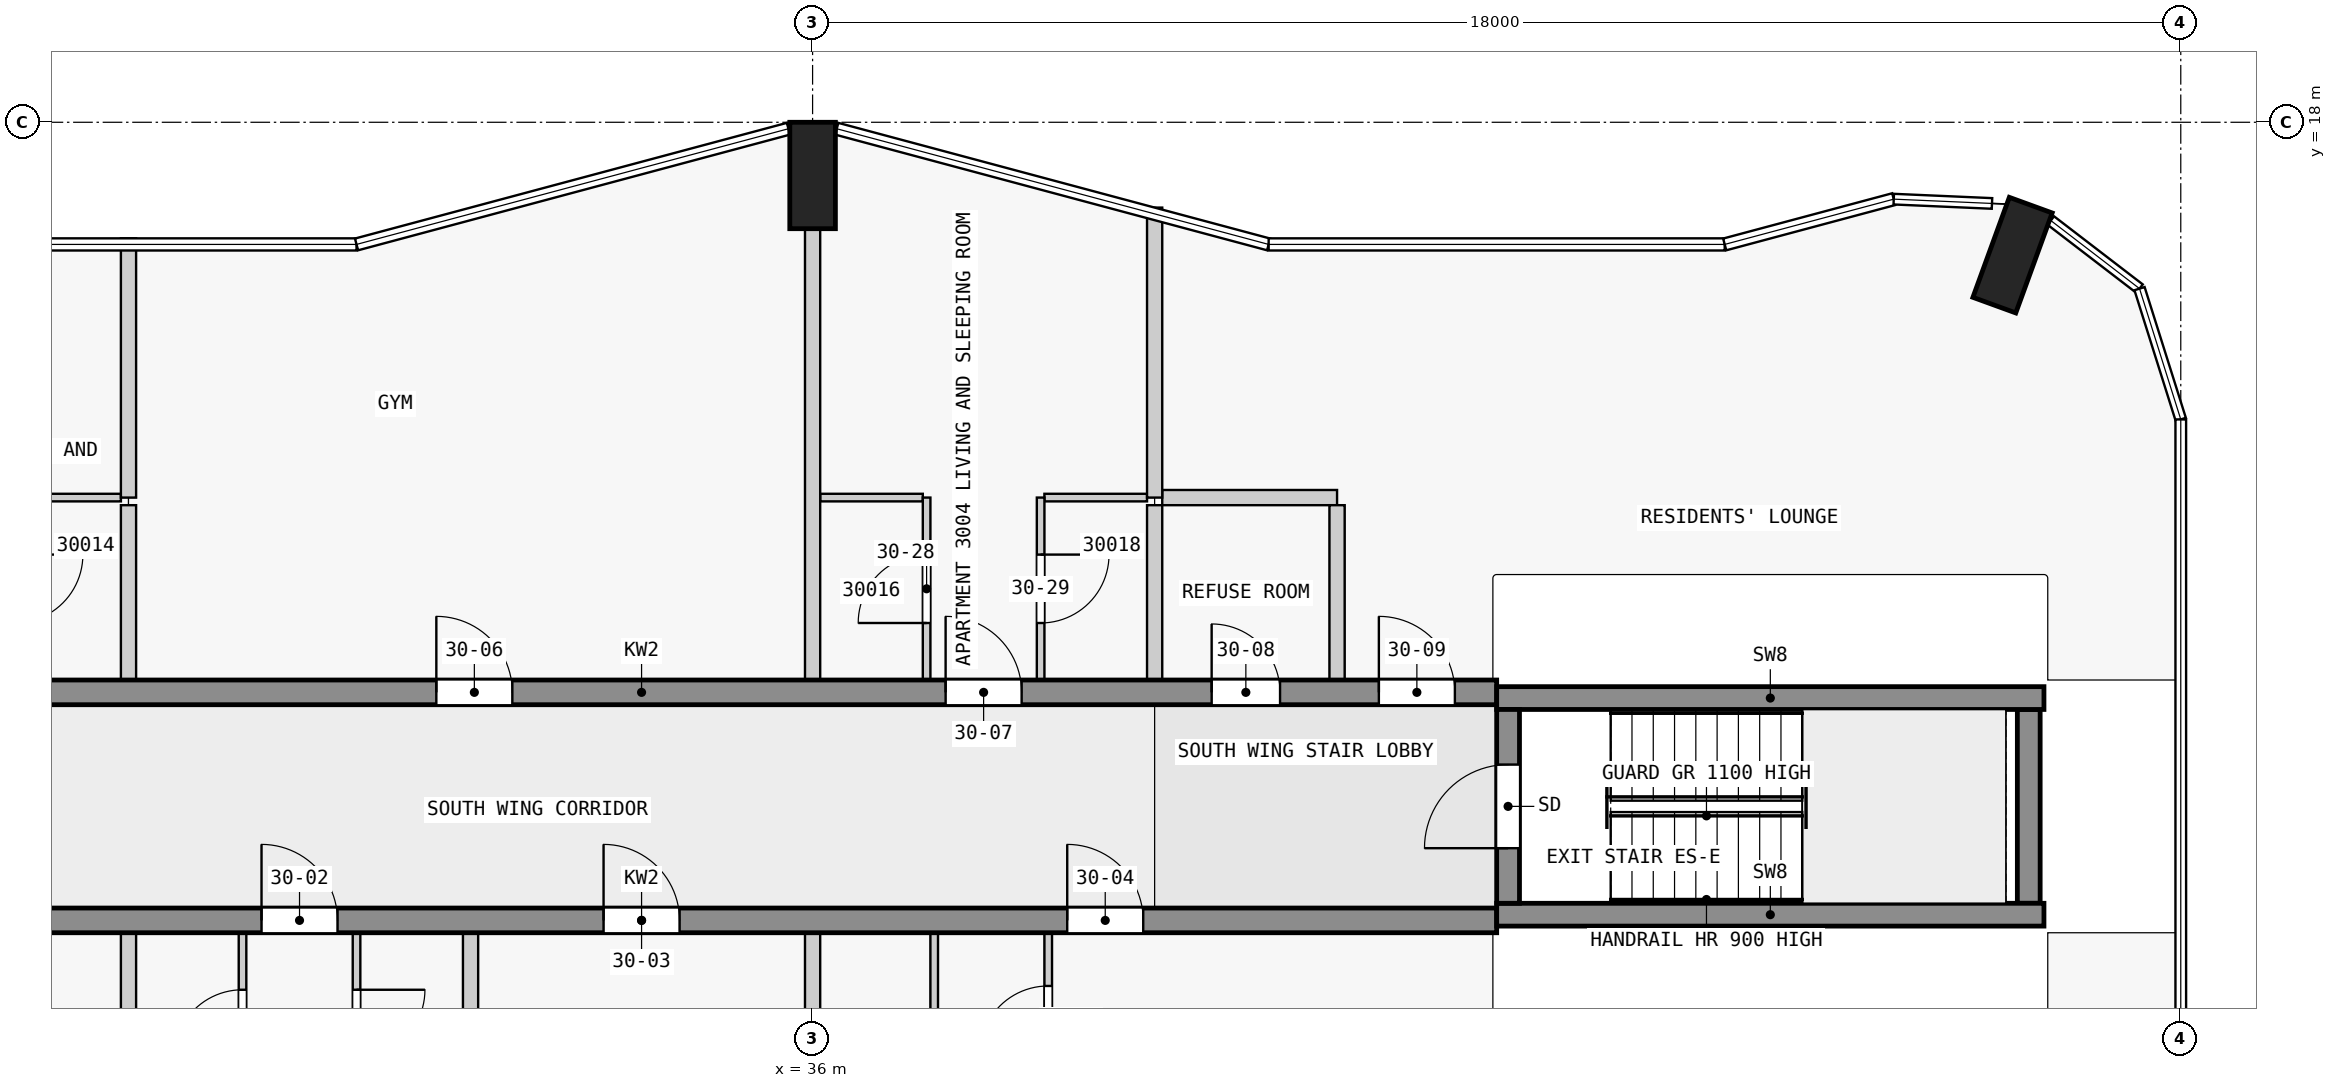
"""IFC4 building model, lengths in metres.
Left out: names, types, materials, properties, quantities, classifications, styles, units other than length and angle.
Written with IfcOpenShell. Run it as: python <this file> out.ifc"""

import sys

from ifc_helpers import new_model, si_unit, direction, frame, frame_2d, origin, origin_2d, place, context, subcontext, project, spatial, rectangle, extrude, element, fill, save


model = new_model("IFC4")
c1 = context("Model", 3, precision=1e-05, world=origin(), true_north=direction((0.0, 1.0)))
c2 = subcontext(c1, "Body", "Model", "MODEL_VIEW")
j1 = project(units=[si_unit("LENGTHUNIT", "METRE"), si_unit("PLANEANGLEUNIT", "RADIAN")], contexts=[c1])
p1 = place(None, origin())
s1 = spatial("IfcSite", under=j1, at=p1, CompositionType="ELEMENT")
p2 = place(p1, origin())
s2 = spatial("IfcBuilding", under=s1, at=p2, CompositionType="ELEMENT")
p3 = place(p2, frame((0.0, 0.0, 116.8)))
s3 = spatial("IfcBuildingStorey", under=s2, at=p3, CompositionType="ELEMENT", Elevation=116.8)
for number, where, z_axis, x_axis in (
    (1, (51.787, 16.252, 0.0), (0.0, 0.0, 1.0), (-0.94, 0.342, 0.0)),
    (2, (36.0, 17.3, 0.0), (0.0, 0.0, 1.0), (1.0, 0.0, 0.0)),
):
    element("IfcColumn", number, at=place(p3, frame(where, z_axis=z_axis, x_axis=x_axis)), inside=s3, PredefinedType="COLUMN", context=c2, shape_type="SweptSolid", body=[
        extrude(rectangle(XDim=0.6, YDim=1.4, at=origin_2d()), origin(), (0.0, 0.0, 1.0), 3.5),
    ])
p4 = place(p3, frame((45.15, 7.725, 0.0), z_axis=(0.0, 0.0, 1.0), x_axis=(0.0, 1.0, 0.0)))
e3 = element("IfcWall", 3, at=p4, inside=s3, PredefinedType="SHEAR", context=c2, shape_type="SweptSolid", body=[
    extrude(rectangle(XDim=2.55, YDim=0.3, at=frame_2d((1.275, 0.0))), origin(), (0.0, 0.0, 1.0), 3.5),
])
p5 = place(p4, frame((0.725, 0.0, 0.0)))
e4 = element("IfcOpeningElement", 4, at=p5, cuts=e3, PredefinedType="OPENING", context=c2, shape_type="SweptSolid", body=[
    extrude(rectangle(XDim=1.1, YDim=2.1, at=frame_2d((0.55, 1.05))), frame((0.0, 0.16, 0.0), z_axis=(0.0, -1.0, 0.0), x_axis=(1.0, 0.0, 0.0)), (0.0, 0.0, 1.0), 0.32),
])
p6 = place(p3, frame((52.0, 7.725, 0.0), z_axis=(0.0, 0.0, 1.0), x_axis=(0.0, 1.0, 0.0)))
e5 = element("IfcWall", 5, at=p6, inside=s3, PredefinedType="SHEAR", context=c2, shape_type="SweptSolid", body=[
    extrude(rectangle(XDim=2.55, YDim=0.3, at=frame_2d((1.275, 0.0))), origin(), (0.0, 0.0, 1.0), 3.5),
])
for number, where, z_axis, x_axis in (
    (6, (45.0, 7.575, 0.0), (0.0, 0.0, 1.0), (1.0, 0.0, 0.0)),
    (7, (45.0, 10.425, 0.0), (0.0, 0.0, 1.0), (1.0, 0.0, 0.0)),
):
    element("IfcWall", number, at=place(p3, frame(where, z_axis=z_axis, x_axis=x_axis)), inside=s3, PredefinedType="SHEAR", context=c2, shape_type="SweptSolid", body=[
        extrude(rectangle(XDim=7.2, YDim=0.3, at=frame_2d((3.6, 0.0))), origin(), (0.0, 0.0, 1.0), 3.5),
    ])
p7 = place(p3, frame((22.5, 7.5, 0.0), z_axis=(0.0, 0.0, 1.0), x_axis=(1.0, 0.0, 0.0)))
e8 = element("IfcWall", 8, at=p7, inside=s3, PredefinedType="SHEAR", context=c2, shape_type="SweptSolid", body=[
    extrude(rectangle(XDim=22.5, YDim=0.325, at=frame_2d((11.25, 0.0))), origin(), (0.0, 0.0, 1.0), 3.25),
])
p8 = place(p7, frame((1.75, 0.0, 0.0)))
e9 = element("IfcOpeningElement", 9, at=p8, cuts=e8, PredefinedType="OPENING", context=c2, shape_type="SweptSolid", body=[
    extrude(rectangle(XDim=1.0, YDim=2.1, at=frame_2d((0.5, 1.05))), frame((0.0, 0.172, 0.0), z_axis=(0.0, -1.0, 0.0), x_axis=(1.0, 0.0, 0.0)), (0.0, 0.0, 1.0), 0.345),
])
p9 = place(p7, frame((6.25, 0.0, 0.0)))
e10 = element("IfcOpeningElement", 10, at=p9, cuts=e8, PredefinedType="OPENING", context=c2, shape_type="SweptSolid", body=[
    extrude(rectangle(XDim=1.0, YDim=2.1, at=frame_2d((0.5, 1.05))), frame((0.0, 0.172, 0.0), z_axis=(0.0, -1.0, 0.0), x_axis=(1.0, 0.0, 0.0)), (0.0, 0.0, 1.0), 0.345),
])
p10 = place(p7, frame((10.75, 0.0, 0.0)))
e11 = element("IfcOpeningElement", 11, at=p10, cuts=e8, PredefinedType="OPENING", context=c2, shape_type="SweptSolid", body=[
    extrude(rectangle(XDim=1.0, YDim=2.1, at=frame_2d((0.5, 1.05))), frame((0.0, 0.172, 0.0), z_axis=(0.0, -1.0, 0.0), x_axis=(1.0, 0.0, 0.0)), (0.0, 0.0, 1.0), 0.345),
])
p11 = place(p7, frame((16.85, 0.0, 0.0)))
e12 = element("IfcOpeningElement", 12, at=p11, cuts=e8, PredefinedType="OPENING", context=c2, shape_type="SweptSolid", body=[
    extrude(rectangle(XDim=1.0, YDim=2.1, at=frame_2d((0.5, 1.05))), frame((0.0, 0.172, 0.0), z_axis=(0.0, -1.0, 0.0), x_axis=(1.0, 0.0, 0.0)), (0.0, 0.0, 1.0), 0.345),
])
p12 = place(p3, frame((22.5, 10.5, 0.0), z_axis=(0.0, 0.0, 1.0), x_axis=(1.0, 0.0, 0.0)))
e13 = element("IfcWall", 13, at=p12, inside=s3, PredefinedType="SHEAR", context=c2, shape_type="SweptSolid", body=[
    extrude(rectangle(XDim=22.5, YDim=0.325, at=frame_2d((11.25, 0.0))), origin(), (0.0, 0.0, 1.0), 3.25),
])
p13 = place(p12, frame((1.75, 0.0, 0.0)))
e14 = element("IfcOpeningElement", 14, at=p13, cuts=e13, PredefinedType="OPENING", context=c2, shape_type="SweptSolid", body=[
    extrude(rectangle(XDim=1.0, YDim=2.1, at=frame_2d((0.5, 1.05))), frame((0.0, 0.172, 0.0), z_axis=(0.0, -1.0, 0.0), x_axis=(1.0, 0.0, 0.0)), (0.0, 0.0, 1.0), 0.345),
])
p14 = place(p12, frame((8.55, 0.0, 0.0)))
e15 = element("IfcOpeningElement", 15, at=p14, cuts=e13, PredefinedType="OPENING", context=c2, shape_type="SweptSolid", body=[
    extrude(rectangle(XDim=1.0, YDim=2.1, at=frame_2d((0.5, 1.05))), frame((0.0, 0.172, 0.0), z_axis=(0.0, -1.0, 0.0), x_axis=(1.0, 0.0, 0.0)), (0.0, 0.0, 1.0), 0.345),
])
p15 = place(p12, frame((15.25, 0.0, 0.0)))
e16 = element("IfcOpeningElement", 16, at=p15, cuts=e13, PredefinedType="OPENING", context=c2, shape_type="SweptSolid", body=[
    extrude(rectangle(XDim=1.0, YDim=2.1, at=frame_2d((0.5, 1.05))), frame((0.0, 0.172, 0.0), z_axis=(0.0, -1.0, 0.0), x_axis=(1.0, 0.0, 0.0)), (0.0, 0.0, 1.0), 0.345),
])
p16 = place(p12, frame((18.75, 0.0, 0.0)))
e17 = element("IfcOpeningElement", 17, at=p16, cuts=e13, PredefinedType="OPENING", context=c2, shape_type="SweptSolid", body=[
    extrude(rectangle(XDim=0.9, YDim=2.1, at=frame_2d((0.45, 1.05))), frame((0.0, 0.172, 0.0), z_axis=(0.0, -1.0, 0.0), x_axis=(1.0, 0.0, 0.0)), (0.0, 0.0, 1.0), 0.345),
])
p17 = place(p12, frame((20.95, 0.0, 0.0)))
e18 = element("IfcOpeningElement", 18, at=p17, cuts=e13, PredefinedType="OPENING", context=c2, shape_type="SweptSolid", body=[
    extrude(rectangle(XDim=1.0, YDim=2.1, at=frame_2d((0.5, 1.05))), frame((0.0, 0.172, 0.0), z_axis=(0.0, -1.0, 0.0), x_axis=(1.0, 0.0, 0.0)), (0.0, 0.0, 1.0), 0.345),
])
for number, where, z_axis, x_axis in (
    (19, (26.9, 13.062, 0.0), (0.0, 0.0, 1.0), (-1.0, 0.0, 0.0)),
    (20, (37.45, 13.062, 0.0), (0.0, 0.0, 1.0), (-1.0, 0.0, 0.0)),
    (21, (40.4, 13.062, 0.0), (0.0, 0.0, 1.0), (-1.0, 0.0, 0.0)),
):
    element("IfcWall", number, at=place(p3, frame(where, z_axis=z_axis, x_axis=x_axis)), inside=s3, PredefinedType="PARTITIONING", context=c2, shape_type="SweptSolid", body=[
        extrude(rectangle(XDim=1.35, YDim=0.1, at=frame_2d((0.675, 0.0))), origin(), (0.0, 0.0, 1.0), 3.25),
    ])
p18 = place(p3, frame((42.9, 13.062, 0.0), z_axis=(0.0, 0.0, 1.0), x_axis=(-1.0, 0.0, 0.0)))
e22 = element("IfcWall", 22, at=p18, inside=s3, PredefinedType="PARTITIONING", context=c2, shape_type="SweptSolid", body=[
    extrude(rectangle(XDim=2.3, YDim=0.2, at=frame_2d((1.15, 0.0))), origin(), (0.0, 0.0, 1.0), 3.25),
])
p19 = place(p3, frame((27.0, 16.473, 0.0), z_axis=(0.0, 0.0, 1.0), x_axis=(0.0, -1.0, 0.0)))
e23 = element("IfcWall", 23, at=p19, inside=s3, PredefinedType="PARTITIONING", context=c2, shape_type="SweptSolid", body=[
    extrude(rectangle(XDim=3.411, YDim=0.2, at=frame_2d((1.705, 0.0))), origin(), (0.0, 0.0, 1.0), 3.25),
])
p20 = place(p3, frame((27.0, 1.527, 0.0), z_axis=(0.0, 0.0, 1.0), x_axis=(0.0, 1.0, 0.0)))
e24 = element("IfcWall", 24, at=p20, inside=s3, PredefinedType="PARTITIONING", context=c2, shape_type="SweptSolid", body=[
    extrude(rectangle(XDim=5.811, YDim=0.2, at=frame_2d((2.905, 0.0))), origin(), (0.0, 0.0, 1.0), 3.25),
])
p21 = place(p3, frame((27.0, 10.663, 0.0), z_axis=(0.0, 0.0, 1.0), x_axis=(0.0, 1.0, 0.0)))
e25 = element("IfcWall", 25, at=p21, inside=s3, PredefinedType="PARTITIONING", context=c2, shape_type="SweptSolid", body=[
    extrude(rectangle(XDim=2.3, YDim=0.2, at=frame_2d((1.15, 0.0))), origin(), (0.0, 0.0, 1.0), 3.25),
])
p22 = place(p3, frame((28.5, 4.938, 0.0), z_axis=(0.0, 0.0, 1.0), x_axis=(0.0, 1.0, 0.0)))
e26 = element("IfcWall", 26, at=p22, inside=s3, PredefinedType="PARTITIONING", context=c2, shape_type="SweptSolid", body=[
    extrude(rectangle(XDim=2.4, YDim=0.1, at=frame_2d((1.2, 0.0))), origin(), (0.0, 0.0, 1.0), 3.25),
])
p23 = place(p22, frame((0.75, 0.0, 0.0)))
e27 = element("IfcOpeningElement", 27, at=p23, cuts=e26, PredefinedType="OPENING", context=c2, shape_type="SweptSolid", body=[
    extrude(rectangle(XDim=0.9, YDim=2.1, at=frame_2d((0.45, 1.05))), frame((0.0, 0.06, 0.0), z_axis=(0.0, -1.0, 0.0), x_axis=(1.0, 0.0, 0.0)), (0.0, 0.0, 1.0), 0.12),
])
p24 = place(p3, frame((30.0, 7.337, 0.0), z_axis=(0.0, 0.0, 1.0), x_axis=(0.0, -1.0, 0.0)))
e28 = element("IfcWall", 28, at=p24, inside=s3, PredefinedType="PARTITIONING", context=c2, shape_type="SweptSolid", body=[
    extrude(rectangle(XDim=2.4, YDim=0.1, at=frame_2d((1.2, 0.0))), origin(), (0.0, 0.0, 1.0), 3.25),
])
p25 = place(p24, frame((0.75, 0.0, 0.0)))
e29 = element("IfcOpeningElement", 29, at=p25, cuts=e28, PredefinedType="OPENING", context=c2, shape_type="SweptSolid", body=[
    extrude(rectangle(XDim=0.9, YDim=2.1, at=frame_2d((0.45, 1.05))), frame((0.0, 0.06, 0.0), z_axis=(0.0, -1.0, 0.0), x_axis=(1.0, 0.0, 0.0)), (0.0, 0.0, 1.0), 0.12),
])
p26 = place(p3, frame((31.5, 5.038, 0.0), z_axis=(0.0, 0.0, 1.0), x_axis=(0.0, 1.0, 0.0)))
e30 = element("IfcWall", 30, at=p26, inside=s3, PredefinedType="PARTITIONING", context=c2, shape_type="SweptSolid", body=[
    extrude(rectangle(XDim=2.3, YDim=0.2, at=frame_2d((1.15, 0.0))), origin(), (0.0, 0.0, 1.0), 3.25),
])
for number, where, z_axis, x_axis in (
    (31, (36.0, 1.4, 0.0), (0.0, 0.0, 1.0), (0.0, 1.0, 0.0)),
    (32, (36.0, 10.663, 0.0), (0.0, 0.0, 1.0), (0.0, 1.0, 0.0)),
):
    element("IfcWall", number, at=place(p3, frame(where, z_axis=z_axis, x_axis=x_axis)), inside=s3, PredefinedType="PARTITIONING", context=c2, shape_type="SweptSolid", body=[
        extrude(rectangle(XDim=5.938, YDim=0.2, at=frame_2d((2.969, 0.0))), origin(), (0.0, 0.0, 1.0), 3.25),
    ])
p27 = place(p3, frame((37.5, 10.663, 0.0), z_axis=(0.0, 0.0, 1.0), x_axis=(0.0, 1.0, 0.0)))
e33 = element("IfcWall", 33, at=p27, inside=s3, PredefinedType="PARTITIONING", context=c2, shape_type="SweptSolid", body=[
    extrude(rectangle(XDim=2.4, YDim=0.1, at=frame_2d((1.2, 0.0))), origin(), (0.0, 0.0, 1.0), 3.25),
])
p28 = place(p27, frame((0.75, 0.0, 0.0)))
e34 = element("IfcOpeningElement", 34, at=p28, cuts=e33, PredefinedType="OPENING", context=c2, shape_type="SweptSolid", body=[
    extrude(rectangle(XDim=0.9, YDim=2.1, at=frame_2d((0.45, 1.05))), frame((0.0, 0.06, 0.0), z_axis=(0.0, -1.0, 0.0), x_axis=(1.0, 0.0, 0.0)), (0.0, 0.0, 1.0), 0.12),
])
p29 = place(p3, frame((37.6, 4.988, 0.0), z_axis=(0.0, 0.0, 1.0), x_axis=(0.0, 1.0, 0.0)))
e35 = element("IfcWall", 35, at=p29, inside=s3, PredefinedType="PARTITIONING", context=c2, shape_type="SweptSolid", body=[
    extrude(rectangle(XDim=2.35, YDim=0.1, at=frame_2d((1.175, 0.0))), origin(), (0.0, 0.0, 1.0), 3.25),
])
p30 = place(p3, frame((39.0, 13.062, 0.0), z_axis=(0.0, 0.0, 1.0), x_axis=(0.0, -1.0, 0.0)))
e36 = element("IfcWall", 36, at=p30, inside=s3, PredefinedType="PARTITIONING", context=c2, shape_type="SweptSolid", body=[
    extrude(rectangle(XDim=2.4, YDim=0.1, at=frame_2d((1.2, 0.0))), origin(), (0.0, 0.0, 1.0), 3.25),
])
p31 = place(p30, frame((0.75, 0.0, 0.0)))
e37 = element("IfcOpeningElement", 37, at=p31, cuts=e36, PredefinedType="OPENING", context=c2, shape_type="SweptSolid", body=[
    extrude(rectangle(XDim=0.9, YDim=2.1, at=frame_2d((0.45, 1.05))), frame((0.0, 0.06, 0.0), z_axis=(0.0, -1.0, 0.0), x_axis=(1.0, 0.0, 0.0)), (0.0, 0.0, 1.0), 0.12),
])
p32 = place(p3, frame((39.1, 4.988, 0.0), z_axis=(0.0, 0.0, 1.0), x_axis=(0.0, 1.0, 0.0)))
e38 = element("IfcWall", 38, at=p32, inside=s3, PredefinedType="PARTITIONING", context=c2, shape_type="SweptSolid", body=[
    extrude(rectangle(XDim=2.35, YDim=0.1, at=frame_2d((1.175, 0.0))), origin(), (0.0, 0.0, 1.0), 3.25),
])
p33 = place(p32, frame((0.75, 0.0, 0.0)))
e39 = element("IfcOpeningElement", 39, at=p33, cuts=e38, PredefinedType="OPENING", context=c2, shape_type="SweptSolid", body=[
    extrude(rectangle(XDim=0.9, YDim=2.1, at=frame_2d((0.45, 1.05))), frame((0.0, 0.06, 0.0), z_axis=(0.0, -1.0, 0.0), x_axis=(1.0, 0.0, 0.0)), (0.0, 0.0, 1.0), 0.12),
])
p34 = place(p3, frame((40.5, 16.878, 0.0), z_axis=(0.0, 0.0, 1.0), x_axis=(0.0, -1.0, 0.0)))
e40 = element("IfcWall", 40, at=p34, inside=s3, PredefinedType="PARTITIONING", context=c2, shape_type="SweptSolid", body=[
    extrude(rectangle(XDim=3.815, YDim=0.2, at=frame_2d((1.908, 0.0))), origin(), (0.0, 0.0, 1.0), 3.25),
])
for number, where, z_axis, x_axis in (
    (41, (40.5, 10.663, 0.0), (0.0, 0.0, 1.0), (0.0, 1.0, 0.0)),
    (42, (42.9, 10.663, 0.0), (0.0, 0.0, 1.0), (0.0, 1.0, 0.0)),
):
    element("IfcWall", number, at=place(p3, frame(where, z_axis=z_axis, x_axis=x_axis)), inside=s3, PredefinedType="PARTITIONING", context=c2, shape_type="SweptSolid", body=[
        extrude(rectangle(XDim=2.3, YDim=0.2, at=frame_2d((1.15, 0.0))), origin(), (0.0, 0.0, 1.0), 3.25),
    ])
p35 = place(p5, origin())
e43 = element("IfcDoor", 43, at=p35, inside=s3, OperationType="SINGLE_SWING_LEFT", PredefinedType="DOOR", context=c2, shape_type="SweptSolid", body=[
    extrude(rectangle(XDim=1.1, YDim=2.1, at=frame_2d((0.55, 1.05))), frame((0.0, 0.025, 0.0), z_axis=(0.0, -1.0, 0.0), x_axis=(1.0, 0.0, 0.0)), (0.0, 0.0, 1.0), 0.05),
])
fill(e4, e43)
p36 = place(p9, origin())
e44 = element("IfcDoor", 44, at=p36, inside=s3, OperationType="SINGLE_SWING_LEFT", PredefinedType="DOOR", context=c2, shape_type="SweptSolid", body=[
    extrude(rectangle(XDim=1.0, YDim=2.1, at=frame_2d((0.5, 1.05))), frame((0.0, 0.025, 0.0), z_axis=(0.0, -1.0, 0.0), x_axis=(1.0, 0.0, 0.0)), (0.0, 0.0, 1.0), 0.05),
])
fill(e10, e44)
p37 = place(p10, origin())
e45 = element("IfcDoor", 45, at=p37, inside=s3, OperationType="SINGLE_SWING_LEFT", PredefinedType="DOOR", context=c2, shape_type="SweptSolid", body=[
    extrude(rectangle(XDim=1.0, YDim=2.1, at=frame_2d((0.5, 1.05))), frame((0.0, 0.025, 0.0), z_axis=(0.0, -1.0, 0.0), x_axis=(1.0, 0.0, 0.0)), (0.0, 0.0, 1.0), 0.05),
])
fill(e11, e45)
p38 = place(p11, origin())
e46 = element("IfcDoor", 46, at=p38, inside=s3, OperationType="SINGLE_SWING_RIGHT", PredefinedType="DOOR", context=c2, shape_type="SweptSolid", body=[
    extrude(rectangle(XDim=1.0, YDim=2.1, at=frame_2d((0.5, 1.05))), frame((0.0, 0.025, 0.0), z_axis=(0.0, -1.0, 0.0), x_axis=(1.0, 0.0, 0.0)), (0.0, 0.0, 1.0), 0.05),
])
fill(e12, e46)
p39 = place(p14, origin())
e47 = element("IfcDoor", 47, at=p39, inside=s3, OperationType="SINGLE_SWING_LEFT", PredefinedType="DOOR", context=c2, shape_type="SweptSolid", body=[
    extrude(rectangle(XDim=1.0, YDim=2.1, at=frame_2d((0.5, 1.05))), frame((0.0, 0.025, 0.0), z_axis=(0.0, -1.0, 0.0), x_axis=(1.0, 0.0, 0.0)), (0.0, 0.0, 1.0), 0.05),
])
fill(e15, e47)
p40 = place(p15, origin())
e48 = element("IfcDoor", 48, at=p40, inside=s3, OperationType="SINGLE_SWING_RIGHT", PredefinedType="DOOR", context=c2, shape_type="SweptSolid", body=[
    extrude(rectangle(XDim=1.0, YDim=2.1, at=frame_2d((0.5, 1.05))), frame((0.0, 0.025, 0.0), z_axis=(0.0, -1.0, 0.0), x_axis=(1.0, 0.0, 0.0)), (0.0, 0.0, 1.0), 0.05),
])
fill(e16, e48)
p41 = place(p16, origin())
e49 = element("IfcDoor", 49, at=p41, inside=s3, OperationType="SINGLE_SWING_RIGHT", PredefinedType="DOOR", context=c2, shape_type="SweptSolid", body=[
    extrude(rectangle(XDim=0.9, YDim=2.1, at=frame_2d((0.45, 1.05))), frame((0.0, 0.025, 0.0), z_axis=(0.0, -1.0, 0.0), x_axis=(1.0, 0.0, 0.0)), (0.0, 0.0, 1.0), 0.05),
])
fill(e17, e49)
p42 = place(p17, origin())
e50 = element("IfcDoor", 50, at=p42, inside=s3, OperationType="SINGLE_SWING_RIGHT", PredefinedType="DOOR", context=c2, shape_type="SweptSolid", body=[
    extrude(rectangle(XDim=1.0, YDim=2.1, at=frame_2d((0.5, 1.05))), frame((0.0, 0.025, 0.0), z_axis=(0.0, -1.0, 0.0), x_axis=(1.0, 0.0, 0.0)), (0.0, 0.0, 1.0), 0.05),
])
fill(e18, e50)
p43 = place(p23, origin())
e51 = element("IfcDoor", 51, at=p43, inside=s3, OperationType="SINGLE_SWING_LEFT", PredefinedType="DOOR", context=c2, shape_type="SweptSolid", body=[
    extrude(rectangle(XDim=0.9, YDim=2.1, at=frame_2d((0.45, 1.05))), frame((0.0, 0.025, 0.0), z_axis=(0.0, -1.0, 0.0), x_axis=(1.0, 0.0, 0.0)), (0.0, 0.0, 1.0), 0.05),
])
fill(e27, e51)
p44 = place(p25, origin())
e52 = element("IfcDoor", 52, at=p44, inside=s3, OperationType="SINGLE_SWING_LEFT", PredefinedType="DOOR", context=c2, shape_type="SweptSolid", body=[
    extrude(rectangle(XDim=0.9, YDim=2.1, at=frame_2d((0.45, 1.05))), frame((0.0, 0.025, 0.0), z_axis=(0.0, -1.0, 0.0), x_axis=(1.0, 0.0, 0.0)), (0.0, 0.0, 1.0), 0.05),
])
fill(e29, e52)
p45 = place(p33, origin())
e53 = element("IfcDoor", 53, at=p45, inside=s3, OperationType="SINGLE_SWING_RIGHT", PredefinedType="DOOR", context=c2, shape_type="SweptSolid", body=[
    extrude(rectangle(XDim=0.9, YDim=2.1, at=frame_2d((0.45, 1.05))), frame((0.0, 0.025, 0.0), z_axis=(0.0, -1.0, 0.0), x_axis=(1.0, 0.0, 0.0)), (0.0, 0.0, 1.0), 0.05),
])
fill(e39, e53)
p46 = place(p28, origin())
e54 = element("IfcDoor", 54, at=p46, inside=s3, OperationType="SINGLE_SWING_LEFT", PredefinedType="DOOR", context=c2, shape_type="SweptSolid", body=[
    extrude(rectangle(XDim=0.9, YDim=2.1, at=frame_2d((0.45, 1.05))), frame((0.0, 0.025, 0.0), z_axis=(0.0, -1.0, 0.0), x_axis=(1.0, 0.0, 0.0)), (0.0, 0.0, 1.0), 0.05),
])
fill(e34, e54)
p47 = place(p31, origin())
e55 = element("IfcDoor", 55, at=p47, inside=s3, OperationType="SINGLE_SWING_LEFT", PredefinedType="DOOR", context=c2, shape_type="SweptSolid", body=[
    extrude(rectangle(XDim=0.9, YDim=2.1, at=frame_2d((0.45, 1.05))), frame((0.0, 0.025, 0.0), z_axis=(0.0, -1.0, 0.0), x_axis=(1.0, 0.0, 0.0)), (0.0, 0.0, 1.0), 0.05),
])
fill(e37, e55)
save(model, sys.argv[1])
